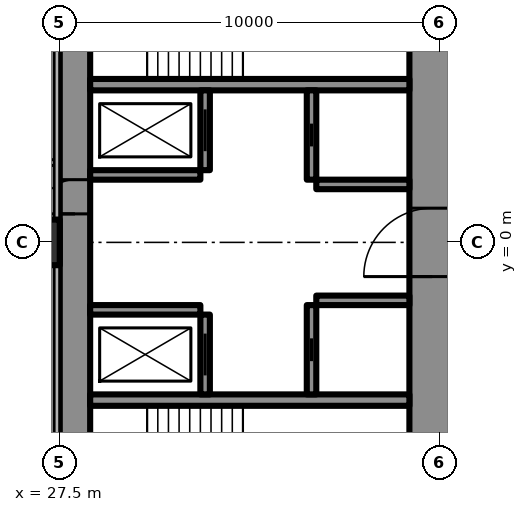
"""IFC4 building model, lengths in metres.
Left out: names, types, materials, properties, quantities, classifications, styles, units other than length and angle.
Written with IfcOpenShell. Run it as: python <this file> out.ifc"""

import sys

from ifc_helpers import new_model, si_unit, direction, frame, frame_2d, origin, origin_2d, place, context, subcontext, project, spatial, rectangle, hollow_rectangle, extrude, element, fill, save


model = new_model("IFC4")
c1 = context("Model", 3, precision=1e-05, world=origin(), true_north=direction((0.0, 1.0)))
c2 = subcontext(c1, "Body", "Model", "MODEL_VIEW")
j1 = project(units=[si_unit("LENGTHUNIT", "METRE"), si_unit("PLANEANGLEUNIT", "RADIAN")], contexts=[c1])
p1 = place(None, origin())
s1 = spatial("IfcSite", under=j1, at=p1, CompositionType="ELEMENT")
p2 = place(p1, origin())
s2 = spatial("IfcBuilding", under=s1, at=p2, CompositionType="ELEMENT")
p3 = place(p2, frame((0.0, 0.0, 215.3)))
s3 = spatial("IfcBuildingStorey", under=s2, at=p3, CompositionType="ELEMENT", Elevation=215.3)
p4 = place(p3, frame((27.9, -8.6, 0.0), z_axis=(0.0, 0.0, 1.0), x_axis=(0.0, 1.0, 0.0)))
e1 = element("IfcWall", 1, at=p4, inside=s3, PredefinedType="SHEAR", context=c2, shape_type="SweptSolid", body=[
    extrude(rectangle(XDim=17.2, YDim=0.8, at=frame_2d((8.6, 0.0))), origin(), (0.0, 0.0, 1.0), 3.6),
])
p5 = place(p4, frame((9.35, 0.0, 0.0)))
e2 = element("IfcOpeningElement", 2, at=p5, cuts=e1, PredefinedType="OPENING", context=c2, shape_type="SweptSolid", body=[
    extrude(rectangle(XDim=0.9, YDim=2.2, at=frame_2d((0.45, 1.1))), frame((0.0, 0.41, 0.0), z_axis=(0.0, -1.0, 0.0), x_axis=(1.0, 0.0, 0.0)), (0.0, 0.0, 1.0), 0.82),
])
p6 = place(p3, frame((37.3, -8.6, 0.0), z_axis=(0.0, 0.0, 1.0), x_axis=(0.0, 1.0, 0.0)))
e3 = element("IfcWall", 3, at=p6, inside=s3, PredefinedType="SHEAR", context=c2, shape_type="SweptSolid", body=[
    extrude(rectangle(XDim=17.2, YDim=1.2, at=frame_2d((8.6, 0.0))), origin(), (0.0, 0.0, 1.0), 3.6),
])
p7 = place(p6, frame((7.7, 0.0, 0.0)))
e4 = element("IfcOpeningElement", 4, at=p7, cuts=e3, PredefinedType="OPENING", context=c2, shape_type="SweptSolid", body=[
    extrude(rectangle(XDim=1.8, YDim=2.2, at=frame_2d((0.9, 1.1))), frame((0.0, 0.61, 0.0), z_axis=(0.0, -1.0, 0.0), x_axis=(1.0, 0.0, 0.0)), (0.0, 0.0, 1.0), 1.22),
])
for number, where, z_axis, x_axis in (
    (5, (28.3, -4.15, 0.0), (0.0, 0.0, 1.0), (1.0, 0.0, 0.0)),
    (6, (28.3, 4.15, 0.0), (0.0, 0.0, 1.0), (1.0, 0.0, 0.0)),
):
    element("IfcWall", number, at=place(p3, frame(where, z_axis=z_axis, x_axis=x_axis)), inside=s3, PredefinedType="SHEAR", context=c2, shape_type="SweptSolid", body=[
        extrude(rectangle(XDim=8.4, YDim=0.3, at=frame_2d((4.2, 0.0))), origin(), (0.0, 0.0, 1.0), 3.6),
    ])
p8 = place(p3, frame((31.325, -4.0, 0.0), z_axis=(0.0, 0.0, 1.0), x_axis=(0.0, 1.0, 0.0)))
e7 = element("IfcWall", 7, at=p8, inside=s3, PredefinedType="SHEAR", context=c2, shape_type="SweptSolid", body=[
    extrude(rectangle(XDim=2.1, YDim=0.25, at=frame_2d((1.05, 0.0))), origin(), (0.0, 0.0, 1.0), 3.6),
])
p9 = place(p8, frame((0.5, 0.0, 0.0)))
e8 = element("IfcOpeningElement", 8, at=p9, cuts=e7, PredefinedType="OPENING", context=c2, shape_type="SweptSolid", body=[
    extrude(rectangle(XDim=1.1, YDim=2.2, at=frame_2d((0.55, 1.1))), frame((0.0, 0.135, 0.0), z_axis=(0.0, -1.0, 0.0), x_axis=(1.0, 0.0, 0.0)), (0.0, 0.0, 1.0), 0.27),
])
p10 = place(p3, frame((34.125, -4.0, 0.0), z_axis=(0.0, 0.0, 1.0), x_axis=(0.0, 1.0, 0.0)))
e9 = element("IfcWall", 9, at=p10, inside=s3, PredefinedType="SHEAR", context=c2, shape_type="SweptSolid", body=[
    extrude(rectangle(XDim=2.35, YDim=0.25, at=frame_2d((1.175, 0.0))), origin(), (0.0, 0.0, 1.0), 3.6),
])
p11 = place(p10, frame((0.875, 0.0, 0.0)))
e10 = element("IfcOpeningElement", 10, at=p11, cuts=e9, PredefinedType="OPENING", context=c2, shape_type="SweptSolid", body=[
    extrude(rectangle(XDim=0.6, YDim=2.0, at=frame_2d((0.3, 1.0))), frame((0.0, 0.135, 0.0), z_axis=(0.0, -1.0, 0.0), x_axis=(1.0, 0.0, 0.0)), (0.0, 0.0, 1.0), 0.27),
])
p12 = place(p3, frame((28.3, -1.775, 0.0), z_axis=(0.0, 0.0, 1.0), x_axis=(1.0, 0.0, 0.0)))
e11 = element("IfcWall", 11, at=p12, inside=s3, PredefinedType="SHEAR", context=c2, shape_type="SweptSolid", body=[
    extrude(rectangle(XDim=2.9, YDim=0.25, at=frame_2d((1.45, 0.0))), origin(), (0.0, 0.0, 1.0), 3.6),
])
p13 = place(p3, frame((34.25, -1.525, 0.0), z_axis=(0.0, 0.0, 1.0), x_axis=(1.0, 0.0, 0.0)))
e12 = element("IfcWall", 12, at=p13, inside=s3, PredefinedType="SHEAR", context=c2, shape_type="SweptSolid", body=[
    extrude(rectangle(XDim=2.45, YDim=0.25, at=frame_2d((1.225, 0.0))), origin(), (0.0, 0.0, 1.0), 3.6),
])
p14 = place(p3, frame((31.325, 1.9, 0.0), z_axis=(0.0, 0.0, 1.0), x_axis=(0.0, 1.0, 0.0)))
e13 = element("IfcWall", 13, at=p14, inside=s3, PredefinedType="SHEAR", context=c2, shape_type="SweptSolid", body=[
    extrude(rectangle(XDim=2.1, YDim=0.25, at=frame_2d((1.05, 0.0))), origin(), (0.0, 0.0, 1.0), 3.6),
])
p15 = place(p14, frame((0.5, 0.0, 0.0)))
e14 = element("IfcOpeningElement", 14, at=p15, cuts=e13, PredefinedType="OPENING", context=c2, shape_type="SweptSolid", body=[
    extrude(rectangle(XDim=1.1, YDim=2.2, at=frame_2d((0.55, 1.1))), frame((0.0, 0.135, 0.0), z_axis=(0.0, -1.0, 0.0), x_axis=(1.0, 0.0, 0.0)), (0.0, 0.0, 1.0), 0.27),
])
p16 = place(p3, frame((34.125, 1.65, 0.0), z_axis=(0.0, 0.0, 1.0), x_axis=(0.0, 1.0, 0.0)))
e15 = element("IfcWall", 15, at=p16, inside=s3, PredefinedType="SHEAR", context=c2, shape_type="SweptSolid", body=[
    extrude(rectangle(XDim=2.35, YDim=0.25, at=frame_2d((1.175, 0.0))), origin(), (0.0, 0.0, 1.0), 3.6),
])
p17 = place(p16, frame((0.875, 0.0, 0.0)))
e16 = element("IfcOpeningElement", 16, at=p17, cuts=e15, PredefinedType="OPENING", context=c2, shape_type="SweptSolid", body=[
    extrude(rectangle(XDim=0.6, YDim=2.0, at=frame_2d((0.3, 1.0))), frame((0.0, 0.135, 0.0), z_axis=(0.0, -1.0, 0.0), x_axis=(1.0, 0.0, 0.0)), (0.0, 0.0, 1.0), 0.27),
])
p18 = place(p3, frame((28.3, 1.775, 0.0), z_axis=(0.0, 0.0, 1.0), x_axis=(1.0, 0.0, 0.0)))
e17 = element("IfcWall", 17, at=p18, inside=s3, PredefinedType="SHEAR", context=c2, shape_type="SweptSolid", body=[
    extrude(rectangle(XDim=2.9, YDim=0.25, at=frame_2d((1.45, 0.0))), origin(), (0.0, 0.0, 1.0), 3.6),
])
p19 = place(p3, frame((34.25, 1.525, 0.0), z_axis=(0.0, 0.0, 1.0), x_axis=(1.0, 0.0, 0.0)))
e18 = element("IfcWall", 18, at=p19, inside=s3, PredefinedType="SHEAR", context=c2, shape_type="SweptSolid", body=[
    extrude(rectangle(XDim=2.45, YDim=0.25, at=frame_2d((1.225, 0.0))), origin(), (0.0, 0.0, 1.0), 3.6),
])
p20 = place(p3, frame((27.2, -13.8, 0.0), z_axis=(0.0, 0.0, 1.0), x_axis=(0.866027159892, 0.499996958321, 0.0)))
e19 = element("IfcWall", 19, at=p20, inside=s3, PredefinedType="SHEAR", context=c2, shape_type="SweptSolid", body=[
    extrude(rectangle(XDim=27.947, YDim=1.2, at=frame_2d((13.973, 0.0))), origin(), (0.0, 0.0, 1.0), 3.6),
])
p21 = place(p20, frame((4.6, 0.0, 0.0)))
e20 = element("IfcOpeningElement", 20, at=p21, cuts=e19, PredefinedType="OPENING", context=c2, shape_type="SweptSolid", body=[
    extrude(rectangle(XDim=1.0, YDim=2.2, at=frame_2d((0.5, 1.1))), frame((0.0, 0.61, 0.0), z_axis=(0.0, -1.0, 0.0), x_axis=(1.0, 0.0, 0.0)), (0.0, 0.0, 1.0), 1.22),
])
p22 = place(p20, frame((13.395, 0.0, 0.0)))
e21 = element("IfcOpeningElement", 21, at=p22, cuts=e19, PredefinedType="OPENING", context=c2, shape_type="SweptSolid", body=[
    extrude(rectangle(XDim=1.8, YDim=2.2, at=frame_2d((0.9, 1.1))), frame((0.0, 0.61, 0.0), z_axis=(0.0, -1.0, 0.0), x_axis=(1.0, 0.0, 0.0)), (0.0, 0.0, 1.0), 1.22),
])
p23 = place(p3, frame((27.2, 13.8, 0.0), z_axis=(0.0, 0.0, 1.0), x_axis=(0.866024515034, -0.500001539357, 0.0)))
e22 = element("IfcWall", 22, at=p23, inside=s3, PredefinedType="SHEAR", context=c2, shape_type="SweptSolid", body=[
    extrude(rectangle(XDim=26.907, YDim=1.2, at=frame_2d((13.454, 0.0))), origin(), (0.0, 0.0, 1.0), 3.6),
])
p24 = place(p23, frame((4.6, 0.0, 0.0)))
e23 = element("IfcOpeningElement", 23, at=p24, cuts=e22, PredefinedType="OPENING", context=c2, shape_type="SweptSolid", body=[
    extrude(rectangle(XDim=1.0, YDim=2.2, at=frame_2d((0.5, 1.1))), frame((0.0, 0.61, 0.0), z_axis=(0.0, -1.0, 0.0), x_axis=(1.0, 0.0, 0.0)), (0.0, 0.0, 1.0), 1.22),
])
p25 = place(p23, frame((13.395, 0.0, 0.0)))
e24 = element("IfcOpeningElement", 24, at=p25, cuts=e22, PredefinedType="OPENING", context=c2, shape_type="SweptSolid", body=[
    extrude(rectangle(XDim=1.8, YDim=2.2, at=frame_2d((0.9, 1.1))), frame((0.0, 0.61, 0.0), z_axis=(0.0, -1.0, 0.0), x_axis=(1.0, 0.0, 0.0)), (0.0, 0.0, 1.0), 1.22),
])
p26 = place(p3, frame((26.9, 0.0, 0.0), z_axis=(0.0, 0.0, 1.0), x_axis=(1.0, 0.0, 0.0)))
e25 = element("IfcColumn", 25, at=p26, inside=s3, PredefinedType="COLUMN", context=c2, shape_type="SweptSolid", body=[
    extrude(hollow_rectangle(XDim=1.2, YDim=1.2, WallThickness=0.12, at=origin_2d()), origin(), (0.0, 0.0, 1.0), 3.6),
])
p27 = place(p3, frame((28.959, -15.44, 0.0), z_axis=(0.0, 0.0, 1.0), x_axis=(0.866025227435, 0.500000305447, 0.0)))
e26 = element("IfcWall", 26, at=p27, inside=s3, PredefinedType="PARTITIONING", context=c2, shape_type="SweptSolid", body=[
    extrude(rectangle(XDim=30.88, YDim=0.2, at=frame_2d((15.44, 0.0))), origin(), (0.0, 0.0, 1.0), 3.35),
])
p28 = place(p27, frame((0.494, 0.0, 0.0)))
e27 = element("IfcOpeningElement", 27, at=p28, cuts=e26, PredefinedType="OPENING", context=c2, shape_type="SweptSolid", body=[
    extrude(rectangle(XDim=1.8, YDim=2.2, at=frame_2d((0.9, 1.1))), frame((0.0, 0.11, 0.0), z_axis=(0.0, -1.0, 0.0), x_axis=(1.0, 0.0, 0.0)), (0.0, 0.0, 1.0), 0.22),
])
p29 = place(p27, frame((7.687, 0.0, 0.0)))
e28 = element("IfcOpeningElement", 28, at=p29, cuts=e26, PredefinedType="OPENING", context=c2, shape_type="SweptSolid", body=[
    extrude(rectangle(XDim=1.0, YDim=2.2, at=frame_2d((0.5, 1.1))), frame((0.0, 0.11, 0.0), z_axis=(0.0, -1.0, 0.0), x_axis=(1.0, 0.0, 0.0)), (0.0, 0.0, 1.0), 0.22),
])
p30 = place(p27, frame((16.137, 0.0, 0.0)))
e29 = element("IfcOpeningElement", 29, at=p30, cuts=e26, PredefinedType="OPENING", context=c2, shape_type="SweptSolid", body=[
    extrude(rectangle(XDim=0.95, YDim=2.2, at=frame_2d((0.475, 1.1))), frame((0.0, 0.11, 0.0), z_axis=(0.0, -1.0, 0.0), x_axis=(1.0, 0.0, 0.0)), (0.0, 0.0, 1.0), 0.22),
])
p31 = place(p27, frame((20.021, 0.0, 0.0)))
e30 = element("IfcOpeningElement", 30, at=p31, cuts=e26, PredefinedType="OPENING", context=c2, shape_type="SweptSolid", body=[
    extrude(rectangle(XDim=0.95, YDim=2.2, at=frame_2d((0.475, 1.1))), frame((0.0, 0.11, 0.0), z_axis=(0.0, -1.0, 0.0), x_axis=(1.0, 0.0, 0.0)), (0.0, 0.0, 1.0), 0.22),
])
p32 = place(p27, frame((26.253, 0.0, 0.0)))
e31 = element("IfcOpeningElement", 31, at=p32, cuts=e26, PredefinedType="OPENING", context=c2, shape_type="SweptSolid", body=[
    extrude(rectangle(XDim=0.95, YDim=2.2, at=frame_2d((0.475, 1.1))), frame((0.0, 0.11, 0.0), z_axis=(0.0, -1.0, 0.0), x_axis=(1.0, 0.0, 0.0)), (0.0, 0.0, 1.0), 0.22),
])
p33 = place(p3, frame((-27.5, 0.3, 0.0), z_axis=(0.0, 0.0, 1.0), x_axis=(1.0, 0.0, 0.0)))
e32 = element("IfcWall", 32, at=p33, inside=s3, PredefinedType="PARTITIONING", context=c2, shape_type="SweptSolid", body=[
    extrude(rectangle(XDim=55.0, YDim=0.15, at=frame_2d((27.5, 0.0))), origin(), (0.0, 0.0, 1.0), 2.4),
])
p34 = place(p33, frame((1.575, 0.0, 0.0)))
e33 = element("IfcOpeningElement", 33, at=p34, cuts=e32, PredefinedType="OPENING", context=c2, shape_type="SweptSolid", body=[
    extrude(rectangle(XDim=1.0, YDim=2.2, at=frame_2d((0.5, 1.1))), frame((0.0, 0.085, 0.0), z_axis=(0.0, -1.0, 0.0), x_axis=(1.0, 0.0, 0.0)), (0.0, 0.0, 1.0), 0.17),
])
p35 = place(p33, frame((8.525, 0.0, 0.0)))
e34 = element("IfcOpeningElement", 34, at=p35, cuts=e32, PredefinedType="OPENING", context=c2, shape_type="SweptSolid", body=[
    extrude(rectangle(XDim=1.05, YDim=2.4, at=frame_2d((0.525, 1.2))), frame((0.0, 0.085, 0.0), z_axis=(0.0, -1.0, 0.0), x_axis=(1.0, 0.0, 0.0)), (0.0, 0.0, 1.0), 0.17),
])
p36 = place(p33, frame((14.025, 0.0, 0.0)))
e35 = element("IfcOpeningElement", 35, at=p36, cuts=e32, PredefinedType="OPENING", context=c2, shape_type="SweptSolid", body=[
    extrude(rectangle(XDim=1.05, YDim=2.4, at=frame_2d((0.525, 1.2))), frame((0.0, 0.085, 0.0), z_axis=(0.0, -1.0, 0.0), x_axis=(1.0, 0.0, 0.0)), (0.0, 0.0, 1.0), 0.17),
])
p37 = place(p33, frame((19.525, 0.0, 0.0)))
e36 = element("IfcOpeningElement", 36, at=p37, cuts=e32, PredefinedType="OPENING", context=c2, shape_type="SweptSolid", body=[
    extrude(rectangle(XDim=1.05, YDim=2.4, at=frame_2d((0.525, 1.2))), frame((0.0, 0.085, 0.0), z_axis=(0.0, -1.0, 0.0), x_axis=(1.0, 0.0, 0.0)), (0.0, 0.0, 1.0), 0.17),
])
p38 = place(p33, frame((25.025, 0.0, 0.0)))
e37 = element("IfcOpeningElement", 37, at=p38, cuts=e32, PredefinedType="OPENING", context=c2, shape_type="SweptSolid", body=[
    extrude(rectangle(XDim=1.05, YDim=2.4, at=frame_2d((0.525, 1.2))), frame((0.0, 0.085, 0.0), z_axis=(0.0, -1.0, 0.0), x_axis=(1.0, 0.0, 0.0)), (0.0, 0.0, 1.0), 0.17),
])
p39 = place(p33, frame((30.525, 0.0, 0.0)))
e38 = element("IfcOpeningElement", 38, at=p39, cuts=e32, PredefinedType="OPENING", context=c2, shape_type="SweptSolid", body=[
    extrude(rectangle(XDim=1.05, YDim=2.4, at=frame_2d((0.525, 1.2))), frame((0.0, 0.085, 0.0), z_axis=(0.0, -1.0, 0.0), x_axis=(1.0, 0.0, 0.0)), (0.0, 0.0, 1.0), 0.17),
])
p40 = place(p33, frame((36.025, 0.0, 0.0)))
e39 = element("IfcOpeningElement", 39, at=p40, cuts=e32, PredefinedType="OPENING", context=c2, shape_type="SweptSolid", body=[
    extrude(rectangle(XDim=1.05, YDim=2.4, at=frame_2d((0.525, 1.2))), frame((0.0, 0.085, 0.0), z_axis=(0.0, -1.0, 0.0), x_axis=(1.0, 0.0, 0.0)), (0.0, 0.0, 1.0), 0.17),
])
p41 = place(p33, frame((41.525, 0.0, 0.0)))
e40 = element("IfcOpeningElement", 40, at=p41, cuts=e32, PredefinedType="OPENING", context=c2, shape_type="SweptSolid", body=[
    extrude(rectangle(XDim=1.05, YDim=2.4, at=frame_2d((0.525, 1.2))), frame((0.0, 0.085, 0.0), z_axis=(0.0, -1.0, 0.0), x_axis=(1.0, 0.0, 0.0)), (0.0, 0.0, 1.0), 0.17),
])
p42 = place(p33, frame((47.025, 0.0, 0.0)))
e41 = element("IfcOpeningElement", 41, at=p42, cuts=e32, PredefinedType="OPENING", context=c2, shape_type="SweptSolid", body=[
    extrude(rectangle(XDim=1.05, YDim=2.4, at=frame_2d((0.525, 1.2))), frame((0.0, 0.085, 0.0), z_axis=(0.0, -1.0, 0.0), x_axis=(1.0, 0.0, 0.0)), (0.0, 0.0, 1.0), 0.17),
])
p43 = place(p33, frame((52.525, 0.0, 0.0)))
e42 = element("IfcOpeningElement", 42, at=p43, cuts=e32, PredefinedType="OPENING", context=c2, shape_type="SweptSolid", body=[
    extrude(rectangle(XDim=1.05, YDim=2.4, at=frame_2d((0.525, 1.2))), frame((0.0, 0.085, 0.0), z_axis=(0.0, -1.0, 0.0), x_axis=(1.0, 0.0, 0.0)), (0.0, 0.0, 1.0), 0.17),
])
p44 = place(p3, frame((-27.5, 2.1, 0.0), z_axis=(0.0, 0.0, 1.0), x_axis=(1.0, 0.0, 0.0)))
e43 = element("IfcWall", 43, at=p44, inside=s3, PredefinedType="PARTITIONING", context=c2, shape_type="SweptSolid", body=[
    extrude(rectangle(XDim=55.0, YDim=0.15, at=frame_2d((27.5, 0.0))), origin(), (0.0, 0.0, 1.0), 3.4),
])
p45 = place(p44, frame((2.025, 0.0, 0.0)))
e44 = element("IfcOpeningElement", 44, at=p45, cuts=e43, PredefinedType="OPENING", context=c2, shape_type="SweptSolid", body=[
    extrude(rectangle(XDim=1.05, YDim=2.4, at=frame_2d((0.525, 1.2))), frame((0.0, 0.085, 0.0), z_axis=(0.0, -1.0, 0.0), x_axis=(1.0, 0.0, 0.0)), (0.0, 0.0, 1.0), 0.17),
])
p46 = place(p44, frame((8.525, 0.0, 0.0)))
e45 = element("IfcOpeningElement", 45, at=p46, cuts=e43, PredefinedType="OPENING", context=c2, shape_type="SweptSolid", body=[
    extrude(rectangle(XDim=1.05, YDim=2.4, at=frame_2d((0.525, 1.2))), frame((0.0, 0.085, 0.0), z_axis=(0.0, -1.0, 0.0), x_axis=(1.0, 0.0, 0.0)), (0.0, 0.0, 1.0), 0.17),
])
p47 = place(p44, frame((14.025, 0.0, 0.0)))
e46 = element("IfcOpeningElement", 46, at=p47, cuts=e43, PredefinedType="OPENING", context=c2, shape_type="SweptSolid", body=[
    extrude(rectangle(XDim=1.05, YDim=2.4, at=frame_2d((0.525, 1.2))), frame((0.0, 0.085, 0.0), z_axis=(0.0, -1.0, 0.0), x_axis=(1.0, 0.0, 0.0)), (0.0, 0.0, 1.0), 0.17),
])
p48 = place(p44, frame((19.525, 0.0, 0.0)))
e47 = element("IfcOpeningElement", 47, at=p48, cuts=e43, PredefinedType="OPENING", context=c2, shape_type="SweptSolid", body=[
    extrude(rectangle(XDim=1.05, YDim=2.4, at=frame_2d((0.525, 1.2))), frame((0.0, 0.085, 0.0), z_axis=(0.0, -1.0, 0.0), x_axis=(1.0, 0.0, 0.0)), (0.0, 0.0, 1.0), 0.17),
])
p49 = place(p44, frame((25.025, 0.0, 0.0)))
e48 = element("IfcOpeningElement", 48, at=p49, cuts=e43, PredefinedType="OPENING", context=c2, shape_type="SweptSolid", body=[
    extrude(rectangle(XDim=1.05, YDim=2.4, at=frame_2d((0.525, 1.2))), frame((0.0, 0.085, 0.0), z_axis=(0.0, -1.0, 0.0), x_axis=(1.0, 0.0, 0.0)), (0.0, 0.0, 1.0), 0.17),
])
p50 = place(p44, frame((30.525, 0.0, 0.0)))
e49 = element("IfcOpeningElement", 49, at=p50, cuts=e43, PredefinedType="OPENING", context=c2, shape_type="SweptSolid", body=[
    extrude(rectangle(XDim=1.05, YDim=2.4, at=frame_2d((0.525, 1.2))), frame((0.0, 0.085, 0.0), z_axis=(0.0, -1.0, 0.0), x_axis=(1.0, 0.0, 0.0)), (0.0, 0.0, 1.0), 0.17),
])
p51 = place(p44, frame((36.025, 0.0, 0.0)))
e50 = element("IfcOpeningElement", 50, at=p51, cuts=e43, PredefinedType="OPENING", context=c2, shape_type="SweptSolid", body=[
    extrude(rectangle(XDim=1.05, YDim=2.4, at=frame_2d((0.525, 1.2))), frame((0.0, 0.085, 0.0), z_axis=(0.0, -1.0, 0.0), x_axis=(1.0, 0.0, 0.0)), (0.0, 0.0, 1.0), 0.17),
])
p52 = place(p44, frame((41.525, 0.0, 0.0)))
e51 = element("IfcOpeningElement", 51, at=p52, cuts=e43, PredefinedType="OPENING", context=c2, shape_type="SweptSolid", body=[
    extrude(rectangle(XDim=1.05, YDim=2.4, at=frame_2d((0.525, 1.2))), frame((0.0, 0.085, 0.0), z_axis=(0.0, -1.0, 0.0), x_axis=(1.0, 0.0, 0.0)), (0.0, 0.0, 1.0), 0.17),
])
p53 = place(p44, frame((47.025, 0.0, 0.0)))
e52 = element("IfcOpeningElement", 52, at=p53, cuts=e43, PredefinedType="OPENING", context=c2, shape_type="SweptSolid", body=[
    extrude(rectangle(XDim=1.05, YDim=2.4, at=frame_2d((0.525, 1.2))), frame((0.0, 0.085, 0.0), z_axis=(0.0, -1.0, 0.0), x_axis=(1.0, 0.0, 0.0)), (0.0, 0.0, 1.0), 0.17),
])
p54 = place(p44, frame((52.525, 0.0, 0.0)))
e53 = element("IfcOpeningElement", 53, at=p54, cuts=e43, PredefinedType="OPENING", context=c2, shape_type="SweptSolid", body=[
    extrude(rectangle(XDim=1.05, YDim=2.4, at=frame_2d((0.525, 1.2))), frame((0.0, 0.085, 0.0), z_axis=(0.0, -1.0, 0.0), x_axis=(1.0, 0.0, 0.0)), (0.0, 0.0, 1.0), 0.17),
])
p55 = place(p7, origin())
e54 = element("IfcDoor", 54, at=p55, inside=s3, OperationType="DOUBLE_DOOR_SINGLE_SWING", PredefinedType="DOOR", context=c2, shape_type="SweptSolid", body=[
    extrude(rectangle(XDim=1.8, YDim=2.2, at=frame_2d((0.9, 1.1))), frame((0.0, 0.025, 0.0), z_axis=(0.0, -1.0, 0.0), x_axis=(1.0, 0.0, 0.0)), (0.0, 0.0, 1.0), 0.05),
])
fill(e4, e54)
p56 = place(p5, origin())
e55 = element("IfcDoor", 55, at=p56, inside=s3, OperationType="SINGLE_SWING_LEFT", PredefinedType="DOOR", context=c2, shape_type="SweptSolid", body=[
    extrude(rectangle(XDim=0.9, YDim=2.2, at=frame_2d((0.45, 1.1))), frame((0.0, 0.025, 0.0), z_axis=(0.0, -1.0, 0.0), x_axis=(1.0, 0.0, 0.0)), (0.0, 0.0, 1.0), 0.05),
])
fill(e2, e55)
p57 = place(p9, origin())
e56 = element("IfcDoor", 56, at=p57, inside=s3, OperationType="SLIDING_TO_LEFT", PredefinedType="USERDEFINED", context=c2, shape_type="SweptSolid", body=[
    extrude(rectangle(XDim=1.1, YDim=2.2, at=frame_2d((0.55, 1.1))), frame((0.0, 0.025, 0.0), z_axis=(0.0, -1.0, 0.0), x_axis=(1.0, 0.0, 0.0)), (0.0, 0.0, 1.0), 0.05),
])
fill(e8, e56)
p58 = place(p15, origin())
e57 = element("IfcDoor", 57, at=p58, inside=s3, OperationType="SLIDING_TO_LEFT", PredefinedType="USERDEFINED", context=c2, shape_type="SweptSolid", body=[
    extrude(rectangle(XDim=1.1, YDim=2.2, at=frame_2d((0.55, 1.1))), frame((0.0, 0.025, 0.0), z_axis=(0.0, -1.0, 0.0), x_axis=(1.0, 0.0, 0.0)), (0.0, 0.0, 1.0), 0.05),
])
fill(e14, e57)
p59 = place(p11, origin())
e58 = element("IfcDoor", 58, at=p59, inside=s3, OperationType="SLIDING_TO_LEFT", PredefinedType="DOOR", context=c2, shape_type="SweptSolid", body=[
    extrude(rectangle(XDim=0.6, YDim=2.0, at=frame_2d((0.3, 1.0))), frame((0.0, 0.025, 0.0), z_axis=(0.0, -1.0, 0.0), x_axis=(1.0, 0.0, 0.0)), (0.0, 0.0, 1.0), 0.05),
])
fill(e10, e58)
p60 = place(p17, origin())
e59 = element("IfcDoor", 59, at=p60, inside=s3, OperationType="SLIDING_TO_LEFT", PredefinedType="DOOR", context=c2, shape_type="SweptSolid", body=[
    extrude(rectangle(XDim=0.6, YDim=2.0, at=frame_2d((0.3, 1.0))), frame((0.0, 0.025, 0.0), z_axis=(0.0, -1.0, 0.0), x_axis=(1.0, 0.0, 0.0)), (0.0, 0.0, 1.0), 0.05),
])
fill(e16, e59)
save(model, sys.argv[1])
